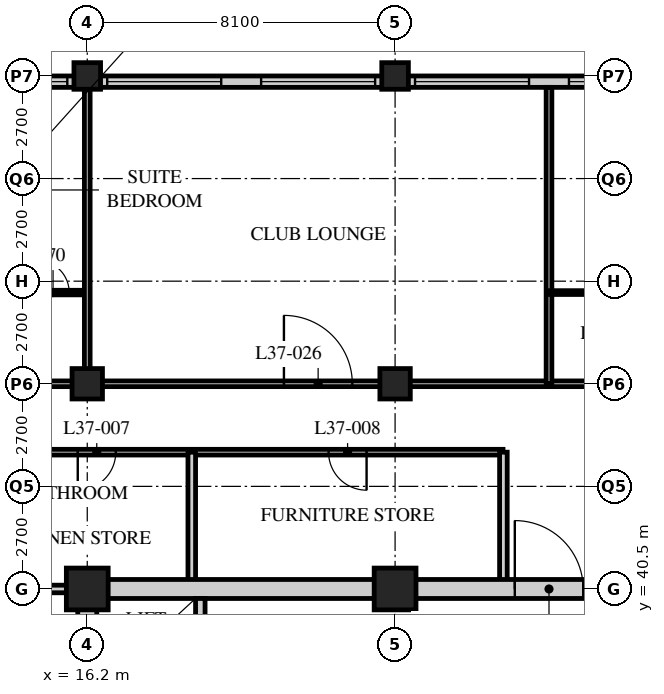
"""IFC4 building model, lengths in metres.
Left out: names, types, materials, properties, quantities, classifications, styles, units other than length and angle.
Written with IfcOpenShell. Run it as: python <this file> out.ifc"""

import sys

from ifc_helpers import new_model, si_unit, direction, frame, frame_2d, origin, origin_2d, place, context, subcontext, project, spatial, rectangle, hollow_rectangle, extrude, element, fill, save


model = new_model("IFC4")
c1 = context("Model", 3, precision=1e-05, world=origin(), true_north=direction((0.0, 1.0)))
c2 = subcontext(c1, "Body", "Model", "MODEL_VIEW")
j1 = project(units=[si_unit("LENGTHUNIT", "METRE"), si_unit("PLANEANGLEUNIT", "RADIAN")], contexts=[c1])
p1 = place(None, origin())
s1 = spatial("IfcSite", under=j1, at=p1, CompositionType="ELEMENT")
p2 = place(p1, origin())
s2 = spatial("IfcBuilding", under=s1, at=p2, CompositionType="ELEMENT")
p3 = place(p2, frame((0.0, 0.0, 144.2)))
s3 = spatial("IfcBuildingStorey", under=s2, at=p3, CompositionType="ELEMENT", Elevation=144.2)
p4 = place(p3, frame((16.2, 40.5, 0.0), z_axis=(0.0, 0.0, 1.0), x_axis=(1.0, 0.0, 0.0)))
e1 = element("IfcColumn", 1, at=p4, inside=s3, PredefinedType="COLUMN", context=c2, shape_type="SweptSolid", body=[
    extrude(hollow_rectangle(XDim=1.1, YDim=1.1, WallThickness=0.1, at=origin_2d()), origin(), (0.0, 0.0, 1.0), 3.4),
])
p5 = place(p3, frame((16.2, 45.9, 0.0), z_axis=(0.0, 0.0, 1.0), x_axis=(1.0, 0.0, 0.0)))
e2 = element("IfcColumn", 2, at=p5, inside=s3, PredefinedType="COLUMN", context=c2, shape_type="SweptSolid", body=[
    extrude(hollow_rectangle(XDim=0.8, YDim=0.8, WallThickness=0.08, at=origin_2d()), origin(), (0.0, 0.0, 1.0), 3.4),
])
p6 = place(p3, frame((16.2, 54.0, 0.0), z_axis=(0.0, 0.0, 1.0), x_axis=(1.0, 0.0, 0.0)))
e3 = element("IfcColumn", 3, at=p6, inside=s3, PredefinedType="COLUMN", context=c2, shape_type="SweptSolid", body=[
    extrude(hollow_rectangle(XDim=0.7, YDim=0.7, WallThickness=0.07, at=origin_2d()), origin(), (0.0, 0.0, 1.0), 3.4),
])
p7 = place(p3, frame((24.3, 40.5, 0.0), z_axis=(0.0, 0.0, 1.0), x_axis=(1.0, 0.0, 0.0)))
e4 = element("IfcColumn", 4, at=p7, inside=s3, PredefinedType="COLUMN", context=c2, shape_type="SweptSolid", body=[
    extrude(hollow_rectangle(XDim=1.1, YDim=1.1, WallThickness=0.1, at=origin_2d()), origin(), (0.0, 0.0, 1.0), 3.4),
])
p8 = place(p3, frame((24.3, 45.9, 0.0), z_axis=(0.0, 0.0, 1.0), x_axis=(1.0, 0.0, 0.0)))
e5 = element("IfcColumn", 5, at=p8, inside=s3, PredefinedType="COLUMN", context=c2, shape_type="SweptSolid", body=[
    extrude(hollow_rectangle(XDim=0.8, YDim=0.8, WallThickness=0.08, at=origin_2d()), origin(), (0.0, 0.0, 1.0), 3.4),
])
p9 = place(p3, frame((24.3, 54.0, 0.0), z_axis=(0.0, 0.0, 1.0), x_axis=(1.0, 0.0, 0.0)))
e6 = element("IfcColumn", 6, at=p9, inside=s3, PredefinedType="COLUMN", context=c2, shape_type="SweptSolid", body=[
    extrude(hollow_rectangle(XDim=0.7, YDim=0.7, WallThickness=0.07, at=origin_2d()), origin(), (0.0, 0.0, 1.0), 3.4),
])
p10 = place(p3, frame((48.3, 53.85, 0.0), z_axis=(0.0, 0.0, 1.0), x_axis=(-1.0, 0.0, 0.0)))
e7 = element("IfcWall", 7, at=p10, inside=s3, PredefinedType="SOLIDWALL", context=c2, shape_type="SweptSolid", body=[
    extrude(rectangle(XDim=40.2, YDim=0.3, at=frame_2d((20.1, 0.0))), origin(), (0.0, 0.0, 1.0), 3.19),
])
p11 = place(p10, frame((0.225, 0.0, 0.9)))
e8 = element("IfcOpeningElement", 8, at=p11, cuts=e7, PredefinedType="OPENING", context=c2, shape_type="SweptSolid", body=[
    extrude(rectangle(XDim=3.0, YDim=1.4, at=frame_2d((1.5, 0.7))), frame((0.0, 0.16, 0.0), z_axis=(0.0, -1.0, 0.0), x_axis=(1.0, 0.0, 0.0)), (0.0, 0.0, 1.0), 0.32),
])
p12 = place(p10, frame((4.275, 0.0, 0.9)))
e9 = element("IfcOpeningElement", 9, at=p12, cuts=e7, PredefinedType="OPENING", context=c2, shape_type="SweptSolid", body=[
    extrude(rectangle(XDim=3.0, YDim=1.4, at=frame_2d((1.5, 0.7))), frame((0.0, 0.16, 0.0), z_axis=(0.0, -1.0, 0.0), x_axis=(1.0, 0.0, 0.0)), (0.0, 0.0, 1.0), 0.32),
])
p13 = place(p10, frame((8.325, 0.0, 0.9)))
e10 = element("IfcOpeningElement", 10, at=p13, cuts=e7, PredefinedType="OPENING", context=c2, shape_type="SweptSolid", body=[
    extrude(rectangle(XDim=3.0, YDim=1.4, at=frame_2d((1.5, 0.7))), frame((0.0, 0.16, 0.0), z_axis=(0.0, -1.0, 0.0), x_axis=(1.0, 0.0, 0.0)), (0.0, 0.0, 1.0), 0.32),
])
p14 = place(p10, frame((12.375, 0.0, 0.9)))
e11 = element("IfcOpeningElement", 11, at=p14, cuts=e7, PredefinedType="OPENING", context=c2, shape_type="SweptSolid", body=[
    extrude(rectangle(XDim=3.0, YDim=1.4, at=frame_2d((1.5, 0.7))), frame((0.0, 0.16, 0.0), z_axis=(0.0, -1.0, 0.0), x_axis=(1.0, 0.0, 0.0)), (0.0, 0.0, 1.0), 0.32),
])
p15 = place(p10, frame((16.425, 0.0, 0.9)))
e12 = element("IfcOpeningElement", 12, at=p15, cuts=e7, PredefinedType="OPENING", context=c2, shape_type="SweptSolid", body=[
    extrude(rectangle(XDim=3.0, YDim=1.4, at=frame_2d((1.5, 0.7))), frame((0.0, 0.16, 0.0), z_axis=(0.0, -1.0, 0.0), x_axis=(1.0, 0.0, 0.0)), (0.0, 0.0, 1.0), 0.32),
])
p16 = place(p10, frame((20.475, 0.0, 0.9)))
e13 = element("IfcOpeningElement", 13, at=p16, cuts=e7, PredefinedType="OPENING", context=c2, shape_type="SweptSolid", body=[
    extrude(rectangle(XDim=3.0, YDim=1.4, at=frame_2d((1.5, 0.7))), frame((0.0, 0.16, 0.0), z_axis=(0.0, -1.0, 0.0), x_axis=(1.0, 0.0, 0.0)), (0.0, 0.0, 1.0), 0.32),
])
p17 = place(p10, frame((24.525, 0.0, 0.9)))
e14 = element("IfcOpeningElement", 14, at=p17, cuts=e7, PredefinedType="OPENING", context=c2, shape_type="SweptSolid", body=[
    extrude(rectangle(XDim=3.0, YDim=1.4, at=frame_2d((1.5, 0.7))), frame((0.0, 0.16, 0.0), z_axis=(0.0, -1.0, 0.0), x_axis=(1.0, 0.0, 0.0)), (0.0, 0.0, 1.0), 0.32),
])
p18 = place(p10, frame((28.575, 0.0, 0.9)))
e15 = element("IfcOpeningElement", 15, at=p18, cuts=e7, PredefinedType="OPENING", context=c2, shape_type="SweptSolid", body=[
    extrude(rectangle(XDim=3.0, YDim=1.4, at=frame_2d((1.5, 0.7))), frame((0.0, 0.16, 0.0), z_axis=(0.0, -1.0, 0.0), x_axis=(1.0, 0.0, 0.0)), (0.0, 0.0, 1.0), 0.32),
])
p19 = place(p10, frame((32.625, 0.0, 0.9)))
e16 = element("IfcOpeningElement", 16, at=p19, cuts=e7, PredefinedType="OPENING", context=c2, shape_type="SweptSolid", body=[
    extrude(rectangle(XDim=3.0, YDim=1.4, at=frame_2d((1.5, 0.7))), frame((0.0, 0.16, 0.0), z_axis=(0.0, -1.0, 0.0), x_axis=(1.0, 0.0, 0.0)), (0.0, 0.0, 1.0), 0.32),
])
p20 = place(p10, frame((36.675, 0.0, 0.9)))
e17 = element("IfcOpeningElement", 17, at=p20, cuts=e7, PredefinedType="OPENING", context=c2, shape_type="SweptSolid", body=[
    extrude(rectangle(XDim=3.0, YDim=1.4, at=frame_2d((1.5, 0.7))), frame((0.0, 0.16, 0.0), z_axis=(0.0, -1.0, 0.0), x_axis=(1.0, 0.0, 0.0)), (0.0, 0.0, 1.0), 0.32),
])
p21 = place(p3, frame((12.15, 45.9, 0.0), z_axis=(0.0, 0.0, 1.0), x_axis=(1.0, 0.0, 0.0)))
e18 = element("IfcWall", 18, at=p21, inside=s3, PredefinedType="PARTITIONING", context=c2, shape_type="SweptSolid", body=[
    extrude(rectangle(XDim=36.45, YDim=0.15, at=frame_2d((18.225, 0.0))), origin(), (0.0, 0.0, 1.0), 2.42),
])
p22 = place(p21, frame((9.225, 0.0, 0.0)))
e19 = element("IfcOpeningElement", 19, at=p22, cuts=e18, PredefinedType="OPENING", context=c2, shape_type="SweptSolid", body=[
    extrude(rectangle(XDim=1.8, YDim=2.4, at=frame_2d((0.9, 1.2))), frame((0.0, 0.085, 0.0), z_axis=(0.0, -1.0, 0.0), x_axis=(1.0, 0.0, 0.0)), (0.0, 0.0, 1.0), 0.17),
])
p23 = place(p21, frame((21.65, 0.0, 0.0)))
e20 = element("IfcOpeningElement", 20, at=p23, cuts=e18, PredefinedType="OPENING", context=c2, shape_type="SweptSolid", body=[
    extrude(rectangle(XDim=1.0, YDim=2.1, at=frame_2d((0.5, 1.05))), frame((0.0, 0.085, 0.0), z_axis=(0.0, -1.0, 0.0), x_axis=(1.0, 0.0, 0.0)), (0.0, 0.0, 1.0), 0.17),
])
p24 = place(p21, frame((24.9, 0.0, 0.0)))
e21 = element("IfcOpeningElement", 21, at=p24, cuts=e18, PredefinedType="OPENING", context=c2, shape_type="SweptSolid", body=[
    extrude(rectangle(XDim=1.0, YDim=2.1, at=frame_2d((0.5, 1.05))), frame((0.0, 0.085, 0.0), z_axis=(0.0, -1.0, 0.0), x_axis=(1.0, 0.0, 0.0)), (0.0, 0.0, 1.0), 0.17),
])
p25 = place(p21, frame((30.8, 0.0, 0.0)))
e22 = element("IfcOpeningElement", 22, at=p25, cuts=e18, PredefinedType="OPENING", context=c2, shape_type="SweptSolid", body=[
    extrude(rectangle(XDim=1.0, YDim=2.1, at=frame_2d((0.5, 1.05))), frame((0.0, 0.085, 0.0), z_axis=(0.0, -1.0, 0.0), x_axis=(1.0, 0.0, 0.0)), (0.0, 0.0, 1.0), 0.17),
])
p26 = place(p21, frame((32.825, 0.0, 0.0)))
e23 = element("IfcOpeningElement", 23, at=p26, cuts=e18, PredefinedType="OPENING", context=c2, shape_type="SweptSolid", body=[
    extrude(rectangle(XDim=1.0, YDim=2.1, at=frame_2d((0.5, 1.05))), frame((0.0, 0.085, 0.0), z_axis=(0.0, -1.0, 0.0), x_axis=(1.0, 0.0, 0.0)), (0.0, 0.0, 1.0), 0.17),
])
p27 = place(p21, frame((1.525, 0.0, 0.0)))
e24 = element("IfcOpeningElement", 24, at=p27, cuts=e18, PredefinedType="OPENING", context=c2, shape_type="SweptSolid", body=[
    extrude(rectangle(XDim=1.0, YDim=2.1, at=frame_2d((0.5, 1.05))), frame((0.0, 0.085, 0.0), z_axis=(0.0, -1.0, 0.0), x_axis=(1.0, 0.0, 0.0)), (0.0, 0.0, 1.0), 0.17),
])
p28 = place(p3, frame((27.14, 44.1, 0.0), z_axis=(0.0, 0.0, 1.0), x_axis=(-1.0, 0.0, 0.0)))
e25 = element("IfcWall", 25, at=p28, inside=s3, PredefinedType="PARTITIONING", context=c2, shape_type="SweptSolid", body=[
    extrude(rectangle(XDim=13.19, YDim=0.15, at=frame_2d((6.595, 0.0))), origin(), (0.0, 0.0, 1.0), 3.19),
])
p29 = place(p28, frame((10.19, 0.0, 0.0)))
e26 = element("IfcOpeningElement", 26, at=p29, cuts=e25, PredefinedType="OPENING", context=c2, shape_type="SweptSolid", body=[
    extrude(rectangle(XDim=1.0, YDim=2.1, at=frame_2d((0.5, 1.05))), frame((0.0, 0.085, 0.0), z_axis=(0.0, -1.0, 0.0), x_axis=(1.0, 0.0, 0.0)), (0.0, 0.0, 1.0), 0.17),
])
p30 = place(p28, frame((3.59, 0.0, 0.0)))
e27 = element("IfcOpeningElement", 27, at=p30, cuts=e25, PredefinedType="OPENING", context=c2, shape_type="SweptSolid", body=[
    extrude(rectangle(XDim=1.0, YDim=2.1, at=frame_2d((0.5, 1.05))), frame((0.0, 0.085, 0.0), z_axis=(0.0, -1.0, 0.0), x_axis=(1.0, 0.0, 0.0)), (0.0, 0.0, 1.0), 0.17),
])
for number, where, z_axis, x_axis in (
    (28, (18.95, 44.1, 0.0), (0.0, 0.0, 1.0), (0.0, -1.0, 0.0)),
    (29, (27.15, 40.5, 0.0), (0.0, 0.0, 1.0), (0.0, 1.0, 0.0)),
):
    element("IfcWall", number, at=place(p3, frame(where, z_axis=z_axis, x_axis=x_axis)), inside=s3, PredefinedType="SOLIDWALL", context=c2, shape_type="SweptSolid", body=[
        extrude(rectangle(XDim=3.6, YDim=0.2, at=frame_2d((1.8, 0.0))), origin(), (0.0, 0.0, 1.0), 3.19),
    ])
p31 = place(p3, frame((13.95, 40.5, 0.0), z_axis=(0.0, 0.0, 1.0), x_axis=(1.0, 0.0, 0.0)))
e30 = element("IfcWall", 30, at=p31, inside=s3, PredefinedType="SOLIDWALL", context=c2, shape_type="SweptSolid", body=[
    extrude(rectangle(XDim=2.25, YDim=0.2, at=frame_2d((1.125, 0.0))), origin(), (0.0, 0.0, 1.0), 3.19),
])
p32 = place(p3, frame((28.35, 45.9, 0.0), z_axis=(0.0, 0.0, 1.0), x_axis=(0.0, 1.0, 0.0)))
e31 = element("IfcWall", 31, at=p32, inside=s3, PredefinedType="PARTITIONING", context=c2, shape_type="SweptSolid", body=[
    extrude(rectangle(XDim=7.8, YDim=0.15, at=frame_2d((3.9, 0.0))), origin(), (0.0, 0.0, 1.0), 3.19),
])
p33 = place(p3, frame((28.35, 48.3, 0.0), z_axis=(0.0, 0.0, 1.0), x_axis=(1.0, 0.0, 0.0)))
e32 = element("IfcWall", 32, at=p33, inside=s3, PredefinedType="PARTITIONING", context=c2, shape_type="SweptSolid", body=[
    extrude(rectangle(XDim=5.2, YDim=0.1, at=frame_2d((2.6, 0.0))), origin(), (0.0, 0.0, 1.0), 3.19),
])
p34 = place(p33, frame((1.3, 0.0, 0.0)))
e33 = element("IfcOpeningElement", 33, at=p34, cuts=e32, PredefinedType="OPENING", context=c2, shape_type="SweptSolid", body=[
    extrude(rectangle(XDim=0.8, YDim=2.1, at=frame_2d((0.4, 1.05))), frame((0.0, 0.06, 0.0), z_axis=(0.0, -1.0, 0.0), x_axis=(1.0, 0.0, 0.0)), (0.0, 0.0, 1.0), 0.12),
])
p35 = place(p33, frame((3.9, 0.0, 0.0)))
e34 = element("IfcOpeningElement", 34, at=p35, cuts=e32, PredefinedType="OPENING", context=c2, shape_type="SweptSolid", body=[
    extrude(rectangle(XDim=0.8, YDim=2.1, at=frame_2d((0.4, 1.05))), frame((0.0, 0.06, 0.0), z_axis=(0.0, -1.0, 0.0), x_axis=(1.0, 0.0, 0.0)), (0.0, 0.0, 1.0), 0.12),
])
p36 = place(p3, frame((8.15, 48.3, 0.0), z_axis=(0.0, 0.0, 1.0), x_axis=(1.0, 0.0, 0.0)))
e35 = element("IfcWall", 35, at=p36, inside=s3, PredefinedType="PARTITIONING", context=c2, shape_type="SweptSolid", body=[
    extrude(rectangle(XDim=8.05, YDim=0.12, at=frame_2d((4.025, 0.0))), origin(), (0.0, 0.0, 1.0), 3.19),
])
p37 = place(p36, frame((6.725, 0.0, 0.0)))
e36 = element("IfcOpeningElement", 36, at=p37, cuts=e35, PredefinedType="OPENING", context=c2, shape_type="SweptSolid", body=[
    extrude(rectangle(XDim=0.85, YDim=2.1, at=frame_2d((0.425, 1.05))), frame((0.0, 0.07, 0.0), z_axis=(0.0, -1.0, 0.0), x_axis=(1.0, 0.0, 0.0)), (0.0, 0.0, 1.0), 0.14),
])
p38 = place(p36, frame((2.875, 0.0, 0.0)))
e37 = element("IfcOpeningElement", 37, at=p38, cuts=e35, PredefinedType="OPENING", context=c2, shape_type="SweptSolid", body=[
    extrude(rectangle(XDim=0.85, YDim=2.1, at=frame_2d((0.425, 1.05))), frame((0.0, 0.07, 0.0), z_axis=(0.0, -1.0, 0.0), x_axis=(1.0, 0.0, 0.0)), (0.0, 0.0, 1.0), 0.14),
])
p39 = place(p3, frame((16.2, 45.9, 0.0), z_axis=(0.0, 0.0, 1.0), x_axis=(0.0, 1.0, 0.0)))
e38 = element("IfcWall", 38, at=p39, inside=s3, PredefinedType="PARTITIONING", context=c2, shape_type="SweptSolid", body=[
    extrude(rectangle(XDim=7.8, YDim=0.15, at=frame_2d((3.9, 0.0))), origin(), (0.0, 0.0, 1.0), 2.42),
])
p40 = place(p3, frame((15.95, 40.5, 0.0), z_axis=(0.0, 0.0, 1.0), x_axis=(1.0, 0.0, 0.0)))
e39 = element("IfcWall", 39, at=p40, inside=s3, PredefinedType="SOLIDWALL", context=c2, shape_type="SweptSolid", body=[
    extrude(rectangle(XDim=24.8, YDim=0.5, at=frame_2d((12.4, 0.0))), origin(), (0.0, 0.0, 1.0), 2.42),
])
p41 = place(p40, frame((11.5, 0.0, 0.0)))
e40 = element("IfcOpeningElement", 40, at=p41, cuts=e39, PredefinedType="OPENING", context=c2, shape_type="SweptSolid", body=[
    extrude(rectangle(XDim=1.8, YDim=2.4, at=frame_2d((0.9, 1.2))), frame((0.0, 0.26, 0.0), z_axis=(0.0, -1.0, 0.0), x_axis=(1.0, 0.0, 0.0)), (0.0, 0.0, 1.0), 0.52),
])
p42 = place(p3, frame((16.2, 24.55, 0.0), z_axis=(0.0, 0.0, 1.0), x_axis=(0.0, 1.0, 0.0)))
e41 = element("IfcWall", 41, at=p42, inside=s3, PredefinedType="SOLIDWALL", context=c2, shape_type="SweptSolid", body=[
    extrude(rectangle(XDim=15.7, YDim=0.5, at=frame_2d((7.85, 0.0))), origin(), (0.0, 0.0, 1.0), 2.42),
])
p43 = place(p3, frame((19.175, 32.5, 0.0), z_axis=(0.0, 0.0, 1.0), x_axis=(0.0, 1.0, 0.0)))
e42 = element("IfcWall", 42, at=p43, inside=s3, PredefinedType="SOLIDWALL", context=c2, shape_type="SweptSolid", body=[
    extrude(rectangle(XDim=7.75, YDim=0.25, at=frame_2d((3.875, 0.0))), origin(), (0.0, 0.0, 1.0), 3.19),
])
p44 = place(p43, frame((0.8, 0.0, 0.0)))
e43 = element("IfcOpeningElement", 43, at=p44, cuts=e42, PredefinedType="OPENING", context=c2, shape_type="SweptSolid", body=[
    extrude(rectangle(XDim=1.1, YDim=2.4, at=frame_2d((0.55, 1.2))), frame((0.0, 0.135, 0.0), z_axis=(0.0, -1.0, 0.0), x_axis=(1.0, 0.0, 0.0)), (0.0, 0.0, 1.0), 0.27),
])
p45 = place(p43, frame((3.4, 0.0, 0.0)))
e44 = element("IfcOpeningElement", 44, at=p45, cuts=e42, PredefinedType="OPENING", context=c2, shape_type="SweptSolid", body=[
    extrude(rectangle(XDim=1.1, YDim=2.4, at=frame_2d((0.55, 1.2))), frame((0.0, 0.135, 0.0), z_axis=(0.0, -1.0, 0.0), x_axis=(1.0, 0.0, 0.0)), (0.0, 0.0, 1.0), 0.27),
])
p46 = place(p43, frame((6.0, 0.0, 0.0)))
e45 = element("IfcOpeningElement", 45, at=p46, cuts=e42, PredefinedType="OPENING", context=c2, shape_type="SweptSolid", body=[
    extrude(rectangle(XDim=1.1, YDim=2.4, at=frame_2d((0.55, 1.2))), frame((0.0, 0.135, 0.0), z_axis=(0.0, -1.0, 0.0), x_axis=(1.0, 0.0, 0.0)), (0.0, 0.0, 1.0), 0.27),
])
p47 = place(p15, origin())
e46 = element("IfcWindow", 46, at=p47, inside=s3, PartitioningType="SINGLE_PANEL", PredefinedType="WINDOW", context=c2, shape_type="SweptSolid", body=[
    extrude(rectangle(XDim=3.0, YDim=1.4, at=frame_2d((1.5, 0.7))), frame((0.0, 0.03, 0.0), z_axis=(0.0, -1.0, 0.0), x_axis=(1.0, 0.0, 0.0)), (0.0, 0.0, 1.0), 0.06),
])
fill(e12, e46)
p48 = place(p16, origin())
e47 = element("IfcWindow", 47, at=p48, inside=s3, PartitioningType="SINGLE_PANEL", PredefinedType="WINDOW", context=c2, shape_type="SweptSolid", body=[
    extrude(rectangle(XDim=3.0, YDim=1.4, at=frame_2d((1.5, 0.7))), frame((0.0, 0.03, 0.0), z_axis=(0.0, -1.0, 0.0), x_axis=(1.0, 0.0, 0.0)), (0.0, 0.0, 1.0), 0.06),
])
fill(e13, e47)
p49 = place(p17, origin())
e48 = element("IfcWindow", 48, at=p49, inside=s3, PartitioningType="SINGLE_PANEL", PredefinedType="WINDOW", context=c2, shape_type="SweptSolid", body=[
    extrude(rectangle(XDim=3.0, YDim=1.4, at=frame_2d((1.5, 0.7))), frame((0.0, 0.03, 0.0), z_axis=(0.0, -1.0, 0.0), x_axis=(1.0, 0.0, 0.0)), (0.0, 0.0, 1.0), 0.06),
])
fill(e14, e48)
p50 = place(p18, origin())
e49 = element("IfcWindow", 49, at=p50, inside=s3, PartitioningType="SINGLE_PANEL", PredefinedType="WINDOW", context=c2, shape_type="SweptSolid", body=[
    extrude(rectangle(XDim=3.0, YDim=1.4, at=frame_2d((1.5, 0.7))), frame((0.0, 0.03, 0.0), z_axis=(0.0, -1.0, 0.0), x_axis=(1.0, 0.0, 0.0)), (0.0, 0.0, 1.0), 0.06),
])
fill(e15, e49)
p51 = place(p19, origin())
e50 = element("IfcWindow", 50, at=p51, inside=s3, PartitioningType="SINGLE_PANEL", PredefinedType="WINDOW", context=c2, shape_type="SweptSolid", body=[
    extrude(rectangle(XDim=3.0, YDim=1.4, at=frame_2d((1.5, 0.7))), frame((0.0, 0.03, 0.0), z_axis=(0.0, -1.0, 0.0), x_axis=(1.0, 0.0, 0.0)), (0.0, 0.0, 1.0), 0.06),
])
fill(e16, e50)
p52 = place(p29, origin())
e51 = element("IfcDoor", 51, at=p52, inside=s3, OperationType="SINGLE_SWING_RIGHT", PredefinedType="DOOR", context=c2, shape_type="SweptSolid", body=[
    extrude(rectangle(XDim=1.0, YDim=2.1, at=frame_2d((0.5, 1.05))), frame((0.0, 0.025, 0.0), z_axis=(0.0, -1.0, 0.0), x_axis=(1.0, 0.0, 0.0)), (0.0, 0.0, 1.0), 0.05),
])
fill(e26, e51)
p53 = place(p30, origin())
e52 = element("IfcDoor", 52, at=p53, inside=s3, OperationType="SINGLE_SWING_LEFT", PredefinedType="DOOR", context=c2, shape_type="SweptSolid", body=[
    extrude(rectangle(XDim=1.0, YDim=2.1, at=frame_2d((0.5, 1.05))), frame((0.0, 0.025, 0.0), z_axis=(0.0, -1.0, 0.0), x_axis=(1.0, 0.0, 0.0)), (0.0, 0.0, 1.0), 0.05),
])
fill(e27, e52)
p54 = place(p22, origin())
e53 = element("IfcDoor", 53, at=p54, inside=s3, OperationType="DOUBLE_DOOR_SINGLE_SWING", PredefinedType="DOOR", context=c2, shape_type="SweptSolid", body=[
    extrude(rectangle(XDim=1.8, YDim=2.4, at=frame_2d((0.9, 1.2))), frame((0.0, 0.025, 0.0), z_axis=(0.0, -1.0, 0.0), x_axis=(1.0, 0.0, 0.0)), (0.0, 0.0, 1.0), 0.05),
])
fill(e19, e53)
p55 = place(p37, origin())
e54 = element("IfcDoor", 54, at=p55, inside=s3, OperationType="SINGLE_SWING_LEFT", PredefinedType="DOOR", context=c2, shape_type="SweptSolid", body=[
    extrude(rectangle(XDim=0.85, YDim=2.1, at=frame_2d((0.425, 1.05))), frame((0.0, 0.025, 0.0), z_axis=(0.0, -1.0, 0.0), x_axis=(1.0, 0.0, 0.0)), (0.0, 0.0, 1.0), 0.05),
])
fill(e36, e54)
p56 = place(p41, origin())
e55 = element("IfcDoor", 55, at=p56, inside=s3, OperationType="DOUBLE_DOOR_SINGLE_SWING", PredefinedType="DOOR", context=c2, shape_type="SweptSolid", body=[
    extrude(rectangle(XDim=1.8, YDim=2.4, at=frame_2d((0.9, 1.2))), frame((0.0, 0.025, 0.0), z_axis=(0.0, -1.0, 0.0), x_axis=(1.0, 0.0, 0.0)), (0.0, 0.0, 1.0), 0.05),
])
fill(e40, e55)
save(model, sys.argv[1])
